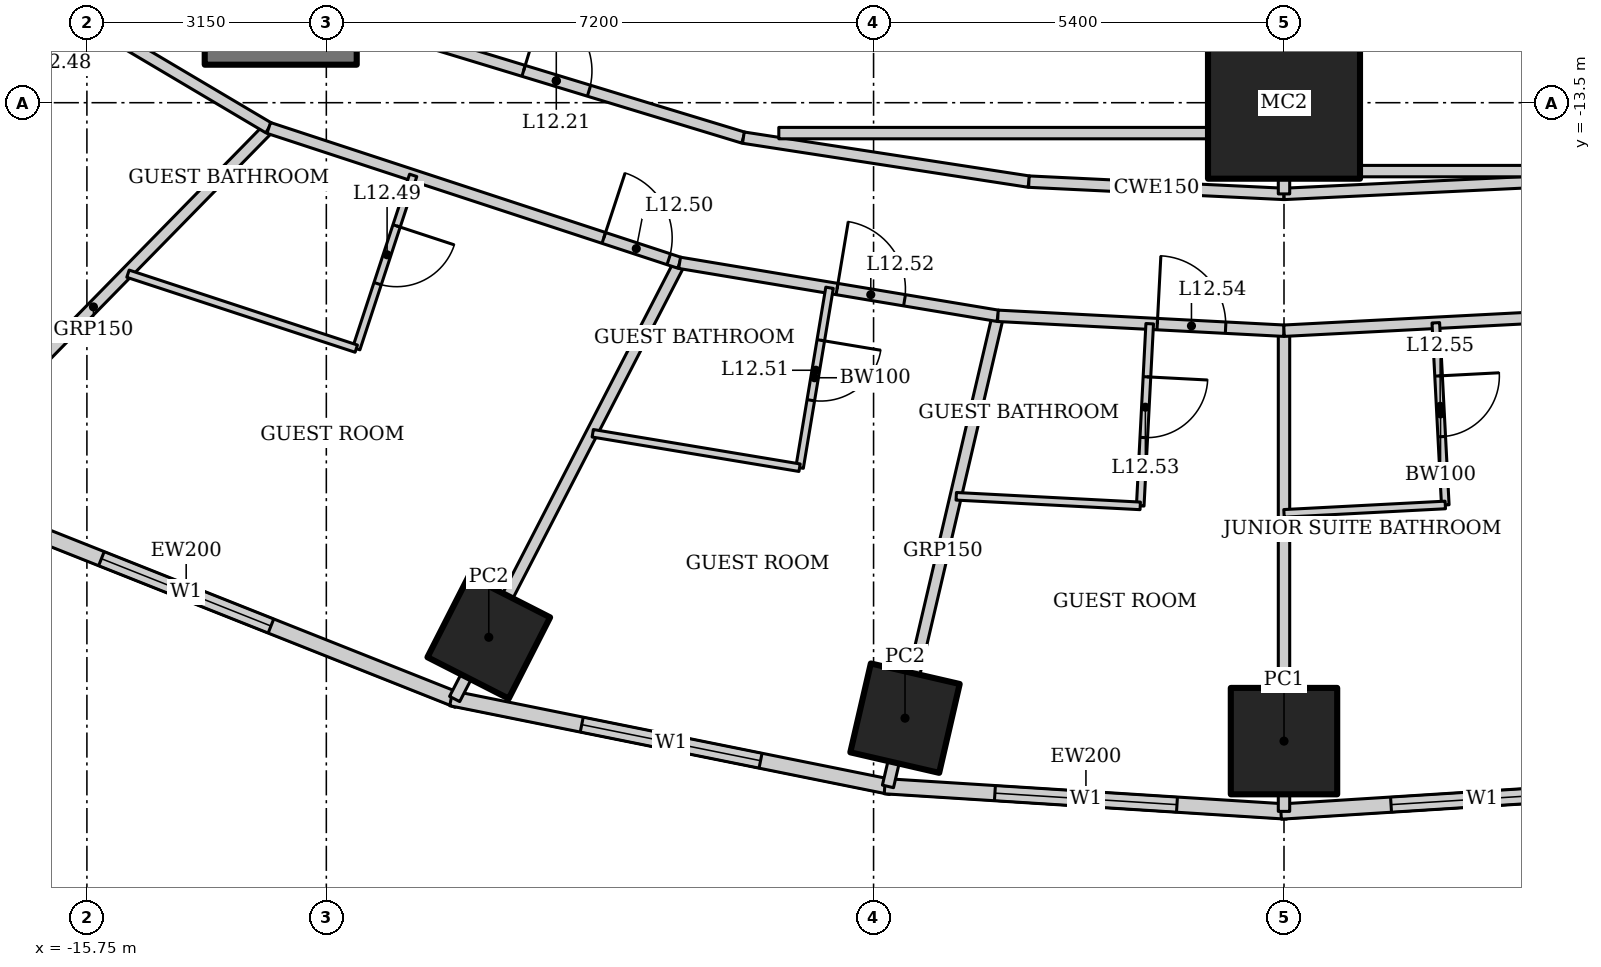
"""IFC4 building model, lengths in metres.
Left out: names, types, materials, properties, quantities, classifications, styles, units other than length and angle.
Written with IfcOpenShell. Run it as: python <this file> out.ifc"""

import sys

from ifc_helpers import new_model, si_unit, direction, frame, frame_2d, origin, origin_2d, place, context, subcontext, project, spatial, rectangle, hollow_rectangle, extrude, element, fill, save


model = new_model("IFC4")
c1 = context("Model", 3, precision=1e-05, world=origin(), true_north=direction((0.0, 1.0)))
c2 = subcontext(c1, "Body", "Model", "MODEL_VIEW")
j1 = project(units=[si_unit("LENGTHUNIT", "METRE"), si_unit("PLANEANGLEUNIT", "RADIAN")], contexts=[c1])
p1 = place(None, origin())
s1 = spatial("IfcSite", under=j1, at=p1, CompositionType="ELEMENT")
p2 = place(p1, origin())
s2 = spatial("IfcBuilding", under=s1, at=p2, CompositionType="ELEMENT")
p3 = place(p2, frame((0.0, 0.0, 58.6)))
s3 = spatial("IfcBuildingStorey", under=s2, at=p3, CompositionType="ELEMENT", Elevation=58.6)
p4 = place(p3, frame((0.0, -13.5, 0.0), z_axis=(0.0, 0.0, 1.0), x_axis=(1.0, 0.0, 0.0)))
e1 = element("IfcColumn", 1, at=p4, inside=s3, PredefinedType="COLUMN", context=c2, shape_type="SweptSolid", body=[
    extrude(hollow_rectangle(XDim=2.0, YDim=2.0, WallThickness=0.17, at=origin_2d()), origin(), (0.0, 0.0, 1.0), 3.6),
])
for number, where, z_axis, x_axis in (
    (2, (-10.463, -20.534, 0.0), (0.0, 0.0, 1.0), (0.454, 0.891, 0.0)),
    (3, (-4.986, -21.598, 0.0), (0.0, 0.0, 1.0), (0.225, 0.974, 0.0)),
):
    element("IfcColumn", number, at=place(p3, frame(where, z_axis=z_axis, x_axis=x_axis)), inside=s3, PredefinedType="COLUMN", context=c2, shape_type="SweptSolid", body=[
        extrude(hollow_rectangle(XDim=1.2, YDim=1.2, WallThickness=0.1, at=origin_2d()), origin(), (0.0, 0.0, 1.0), 3.6),
    ])
p5 = place(p3, frame((0.0, -21.9, 0.0), z_axis=(0.0, 0.0, 1.0), x_axis=(1.0, 0.0, 0.0)))
e4 = element("IfcColumn", 4, at=p5, inside=s3, PredefinedType="COLUMN", context=c2, shape_type="SweptSolid", body=[
    extrude(hollow_rectangle(XDim=1.4, YDim=1.4, WallThickness=0.1, at=origin_2d()), origin(), (0.0, 0.0, 1.0), 3.6),
])
p6 = place(p3, frame((-13.2, 13.0, 0.0), z_axis=(0.0, 0.0, 1.0), x_axis=(0.0, -1.0, 0.0)))
e5 = element("IfcWall", 5, at=p6, inside=s3, PredefinedType="SHEAR", context=c2, shape_type="SweptSolid", body=[
    extrude(rectangle(XDim=26.0, YDim=2.0, at=frame_2d((13.0, 0.0))), origin(), (0.0, 0.0, 1.0), 3.6),
])
p7 = place(p6, frame((12.1, 0.0, 0.0)))
e6 = element("IfcOpeningElement", 6, at=p7, cuts=e5, PredefinedType="OPENING", context=c2, shape_type="SweptSolid", body=[
    extrude(rectangle(XDim=1.8, YDim=2.1, at=frame_2d((0.9, 1.05))), frame((0.0, 1.01, 0.0), z_axis=(0.0, -1.0, 0.0), x_axis=(1.0, 0.0, 0.0)), (0.0, 0.0, 1.0), 2.02),
])
p8 = place(p3, frame((-18.018, -18.523, 0.0), z_axis=(0.0, 0.0, 1.0), x_axis=(0.929358351251, -0.369178892895, 0.0)))
e7 = element("IfcWall", 7, at=p8, inside=s3, PredefinedType="SOLIDWALL", context=c2, shape_type="SweptSolid", body=[
    extrude(rectangle(XDim=7.692, YDim=0.2, at=frame_2d((3.846, 0.0))), origin(), (0.0, 0.0, 1.0), 3.45),
])
p9 = place(p8, frame((2.646, 0.0, 0.5)))
e8 = element("IfcOpeningElement", 8, at=p9, cuts=e7, PredefinedType="OPENING", context=c2, shape_type="SweptSolid", body=[
    extrude(rectangle(XDim=2.4, YDim=2.2, at=frame_2d((1.2, 1.1))), frame((0.0, 0.11, 0.0), z_axis=(0.0, -1.0, 0.0), x_axis=(1.0, 0.0, 0.0)), (0.0, 0.0, 1.0), 0.22),
])
p10 = place(p3, frame((-10.957, -21.337, 0.0), z_axis=(0.0, 0.0, 1.0), x_axis=(0.980251657452, -0.197754110105, 0.0)))
e9 = element("IfcWall", 9, at=p10, inside=s3, PredefinedType="SOLIDWALL", context=c2, shape_type="SweptSolid", body=[
    extrude(rectangle(XDim=5.904, YDim=0.2, at=frame_2d((2.952, 0.0))), origin(), (0.0, 0.0, 1.0), 3.45),
])
p11 = place(p10, frame((1.752, 0.0, 0.5)))
e10 = element("IfcOpeningElement", 10, at=p11, cuts=e9, PredefinedType="OPENING", context=c2, shape_type="SweptSolid", body=[
    extrude(rectangle(XDim=2.4, YDim=2.2, at=frame_2d((1.2, 1.1))), frame((0.0, 0.11, 0.0), z_axis=(0.0, -1.0, 0.0), x_axis=(1.0, 0.0, 0.0)), (0.0, 0.0, 1.0), 0.22),
])
p12 = place(p3, frame((-5.253, -22.493, 0.0), z_axis=(0.0, 0.0, 1.0), x_axis=(0.998018582375, -0.062919863585, 0.0)))
e11 = element("IfcWall", 11, at=p12, inside=s3, PredefinedType="SOLIDWALL", context=c2, shape_type="SweptSolid", body=[
    extrude(rectangle(XDim=5.304, YDim=0.2, at=frame_2d((2.652, 0.0))), origin(), (0.0, 0.0, 1.0), 3.45),
])
p13 = place(p12, frame((1.452, 0.0, 0.5)))
e12 = element("IfcOpeningElement", 12, at=p13, cuts=e11, PredefinedType="OPENING", context=c2, shape_type="SweptSolid", body=[
    extrude(rectangle(XDim=2.4, YDim=2.2, at=frame_2d((1.2, 1.1))), frame((0.0, 0.11, 0.0), z_axis=(0.0, -1.0, 0.0), x_axis=(1.0, 0.0, 0.0)), (0.0, 0.0, 1.0), 0.22),
])
p14 = place(p3, frame((-0.041, -22.827, 0.0), z_axis=(0.0, 0.0, 1.0), x_axis=(0.998018582375, 0.062919863585, 0.0)))
e13 = element("IfcWall", 13, at=p14, inside=s3, PredefinedType="SOLIDWALL", context=c2, shape_type="SweptSolid", body=[
    extrude(rectangle(XDim=5.304, YDim=0.2, at=frame_2d((2.652, 0.0))), origin(), (0.0, 0.0, 1.0), 3.45),
])
p15 = place(p14, frame((1.452, 0.0, 0.5)))
e14 = element("IfcOpeningElement", 14, at=p15, cuts=e13, PredefinedType="OPENING", context=c2, shape_type="SweptSolid", body=[
    extrude(rectangle(XDim=2.4, YDim=2.2, at=frame_2d((1.2, 1.1))), frame((0.0, 0.11, 0.0), z_axis=(0.0, -1.0, 0.0), x_axis=(1.0, 0.0, 0.0)), (0.0, 0.0, 1.0), 0.22),
])
p16 = place(p3, frame((-17.97, -18.542, 0.0), z_axis=(0.0, 0.0, 1.0), x_axis=(0.699736251994, 0.714401272147, 0.0)))
e15 = element("IfcWall", 15, at=p16, inside=s3, PredefinedType="PARTITIONING", context=c2, shape_type="SweptSolid", body=[
    extrude(rectangle(XDim=6.593, YDim=0.15, at=frame_2d((3.296, 0.0))), origin(), (0.0, 0.0, 1.0), 2.528),
])
p17 = place(p3, frame((-10.912, -21.346, 0.0), z_axis=(0.0, 0.0, 1.0), x_axis=(0.458384799126, 0.888753833145, 0.0)))
e16 = element("IfcWall", 16, at=p17, inside=s3, PredefinedType="PARTITIONING", context=c2, shape_type="SweptSolid", body=[
    extrude(rectangle(XDim=6.457, YDim=0.15, at=frame_2d((3.229, 0.0))), origin(), (0.0, 0.0, 1.0), 2.528),
])
p18 = place(p3, frame((-5.211, -22.496, 0.0), z_axis=(0.0, 0.0, 1.0), x_axis=(0.227536694087, 0.973769507042, 0.0)))
e17 = element("IfcWall", 17, at=p18, inside=s3, PredefinedType="PARTITIONING", context=c2, shape_type="SweptSolid", body=[
    extrude(rectangle(XDim=6.358, YDim=0.15, at=frame_2d((3.179, 0.0))), origin(), (0.0, 0.0, 1.0), 2.767),
])
p19 = place(p3, frame((0.0, -22.825, 0.0), z_axis=(0.0, 0.0, 1.0), x_axis=(0.0, 1.0, 0.0)))
e18 = element("IfcWall", 18, at=p19, inside=s3, PredefinedType="PARTITIONING", context=c2, shape_type="SweptSolid", body=[
    extrude(rectangle(XDim=6.325, YDim=0.15, at=frame_2d((3.162, 0.0))), origin(), (0.0, 0.0, 1.0), 2.924),
])
p20 = place(p3, frame((-18.681, -10.675, 0.0), z_axis=(0.0, 0.0, 1.0), x_axis=(0.860147339762, -0.510045639036, 0.0)))
e19 = element("IfcWall", 19, at=p20, inside=s3, PredefinedType="PARTITIONING", context=c2, shape_type="SweptSolid", body=[
    extrude(rectangle(XDim=6.19, YDim=0.15, at=frame_2d((3.095, 0.0))), origin(), (0.0, 0.0, 1.0), 3.45),
])
p21 = place(p20, frame((2.505, 0.0, 0.0)))
e20 = element("IfcOpeningElement", 20, at=p21, cuts=e19, PredefinedType="OPENING", context=c2, shape_type="SweptSolid", body=[
    extrude(rectangle(XDim=0.9, YDim=2.1, at=frame_2d((0.45, 1.05))), frame((0.0, 0.085, 0.0), z_axis=(0.0, -1.0, 0.0), x_axis=(1.0, 0.0, 0.0)), (0.0, 0.0, 1.0), 0.17),
])
p22 = place(p3, frame((-13.357, -13.832, 0.0), z_axis=(0.0, 0.0, 1.0), x_axis=(0.950106803111, -0.311924770869, 0.0)))
e21 = element("IfcWall", 21, at=p22, inside=s3, PredefinedType="PARTITIONING", context=c2, shape_type="SweptSolid", body=[
    extrude(rectangle(XDim=5.689, YDim=0.15, at=frame_2d((2.845, 0.0))), origin(), (0.0, 0.0, 1.0), 3.45),
])
p23 = place(p22, frame((4.639, 0.0, 0.0)))
e22 = element("IfcOpeningElement", 22, at=p23, cuts=e21, PredefinedType="OPENING", context=c2, shape_type="SweptSolid", body=[
    extrude(rectangle(XDim=0.9, YDim=2.1, at=frame_2d((0.45, 1.05))), frame((0.0, 0.085, 0.0), z_axis=(0.0, -1.0, 0.0), x_axis=(1.0, 0.0, 0.0)), (0.0, 0.0, 1.0), 0.17),
])
p24 = place(p3, frame((-7.952, -15.607, 0.0), z_axis=(0.0, 0.0, 1.0), x_axis=(0.98641101506, -0.164296407044, 0.0)))
e23 = element("IfcWall", 23, at=p24, inside=s3, PredefinedType="PARTITIONING", context=c2, shape_type="SweptSolid", body=[
    extrude(rectangle(XDim=4.245, YDim=0.15, at=frame_2d((2.123, 0.0))), origin(), (0.0, 0.0, 1.0), 3.45),
])
p25 = place(p24, frame((2.1, 0.0, 0.0)))
e24 = element("IfcOpeningElement", 24, at=p25, cuts=e23, PredefinedType="OPENING", context=c2, shape_type="SweptSolid", body=[
    extrude(rectangle(XDim=0.9, YDim=2.1, at=frame_2d((0.45, 1.05))), frame((0.0, 0.085, 0.0), z_axis=(0.0, -1.0, 0.0), x_axis=(1.0, 0.0, 0.0)), (0.0, 0.0, 1.0), 0.17),
])
p26 = place(p3, frame((-3.764, -16.304, 0.0), z_axis=(0.0, 0.0, 1.0), x_axis=(0.998649848759, -0.05194689186, 0.0)))
e25 = element("IfcWall", 25, at=p26, inside=s3, PredefinedType="PARTITIONING", context=c2, shape_type="SweptSolid", body=[
    extrude(rectangle(XDim=3.769, YDim=0.15, at=frame_2d((1.885, 0.0))), origin(), (0.0, 0.0, 1.0), 3.45),
])
p27 = place(p26, frame((2.1, 0.0, 0.0)))
e26 = element("IfcOpeningElement", 26, at=p27, cuts=e25, PredefinedType="OPENING", context=c2, shape_type="SweptSolid", body=[
    extrude(rectangle(XDim=0.9, YDim=2.1, at=frame_2d((0.45, 1.05))), frame((0.0, 0.085, 0.0), z_axis=(0.0, -1.0, 0.0), x_axis=(1.0, 0.0, 0.0)), (0.0, 0.0, 1.0), 0.17),
])
p28 = place(p3, frame((0.0, -16.5, 0.0), z_axis=(0.0, 0.0, 1.0), x_axis=(0.998649848759, 0.05194689186, 0.0)))
e27 = element("IfcWall", 27, at=p28, inside=s3, PredefinedType="PARTITIONING", context=c2, shape_type="SweptSolid", body=[
    extrude(rectangle(XDim=3.769, YDim=0.15, at=frame_2d((1.885, 0.0))), origin(), (0.0, 0.0, 1.0), 3.45),
])
p29 = place(p3, frame((-12.036, -12.464, 0.0), z_axis=(0.0, 0.0, 1.0), x_axis=(0.956795045135, -0.290763205385, 0.0)))
e28 = element("IfcWall", 28, at=p29, inside=s3, PredefinedType="PARTITIONING", context=c2, shape_type="SweptSolid", body=[
    extrude(rectangle(XDim=5.146, YDim=0.15, at=frame_2d((2.573, 0.0))), origin(), (0.0, 0.0, 1.0), 3.45),
])
p30 = place(p29, frame((2.123, 0.0, 0.0)))
e29 = element("IfcOpeningElement", 29, at=p30, cuts=e28, PredefinedType="OPENING", context=c2, shape_type="SweptSolid", body=[
    extrude(rectangle(XDim=0.9, YDim=2.1, at=frame_2d((0.45, 1.05))), frame((0.0, 0.085, 0.0), z_axis=(0.0, -1.0, 0.0), x_axis=(1.0, 0.0, 0.0)), (0.0, 0.0, 1.0), 0.17),
])
p31 = place(p3, frame((-7.113, -13.96, 0.0), z_axis=(0.0, 0.0, 1.0), x_axis=(0.988343461108, -0.152240608529, 0.0)))
e30 = element("IfcWall", 30, at=p31, inside=s3, PredefinedType="PARTITIONING", context=c2, shape_type="SweptSolid", body=[
    extrude(rectangle(XDim=3.801, YDim=0.15, at=frame_2d((1.9, 0.0))), origin(), (0.0, 0.0, 1.0), 3.45),
])
for number, where, z_axis, x_axis in (
    (31, (-3.356, -14.538, 0.0), (0.0, 0.0, 1.0), (0.999, -0.048, 0.0)),
    (32, (0.0, -14.7, 0.0), (0.0, 0.0, 1.0), (0.999, 0.048, 0.0)),
):
    element("IfcWall", number, at=place(p3, frame(where, z_axis=z_axis, x_axis=x_axis)), inside=s3, PredefinedType="PARTITIONING", context=c2, shape_type="SweptSolid", body=[
        extrude(rectangle(XDim=3.36, YDim=0.15, at=frame_2d((1.68, 0.0))), origin(), (0.0, 0.0, 1.0), 3.45),
    ])
p32 = place(p3, frame((0.0, -9.2, 0.0), z_axis=(0.0, 0.0, 1.0), x_axis=(0.0, -1.0, 0.0)))
e33 = element("IfcWall", 33, at=p32, inside=s3, PredefinedType="PARTITIONING", context=c2, shape_type="SweptSolid", body=[
    extrude(rectangle(XDim=5.5, YDim=0.15, at=frame_2d((2.75, 0.0))), origin(), (0.0, 0.0, 1.0), 2.924),
])
p33 = place(p3, frame((-6.647, -13.9, 0.0), z_axis=(0.0, 0.0, 1.0), x_axis=(1.0, 0.0, 0.0)))
e34 = element("IfcWall", 34, at=p33, inside=s3, PredefinedType="PARTITIONING", context=c2, shape_type="SweptSolid", body=[
    extrude(rectangle(XDim=6.647, YDim=0.15, at=frame_2d((3.323, 0.0))), origin(), (0.0, 0.0, 1.0), 3.45),
])
p34 = place(p3, frame((0.0, -14.4, 0.0), z_axis=(0.0, 0.0, 1.0), x_axis=(1.0, 0.0, 0.0)))
e35 = element("IfcWall", 35, at=p34, inside=s3, PredefinedType="PARTITIONING", context=c2, shape_type="SweptSolid", body=[
    extrude(rectangle(XDim=3.401, YDim=0.15, at=frame_2d((1.701, 0.0))), origin(), (0.0, 0.0, 1.0), 3.45),
])
p35 = place(p3, frame((-11.457, -14.456, 0.0), z_axis=(0.0, 0.0, 1.0), x_axis=(-0.311890952591, -0.950117905153, 0.0)))
e36 = element("IfcWall", 36, at=p35, inside=s3, PredefinedType="PARTITIONING", context=c2, shape_type="SweptSolid", body=[
    extrude(rectangle(XDim=2.4, YDim=0.1, at=frame_2d((1.2, 0.0))), origin(), (0.0, 0.0, 1.0), 3.45),
])
p36 = place(p35, frame((0.7, 0.0, 0.0)))
e37 = element("IfcOpeningElement", 37, at=p36, cuts=e36, PredefinedType="OPENING", context=c2, shape_type="SweptSolid", body=[
    extrude(rectangle(XDim=0.8, YDim=2.1, at=frame_2d((0.4, 1.05))), frame((0.0, 0.06, 0.0), z_axis=(0.0, -1.0, 0.0), x_axis=(1.0, 0.0, 0.0)), (0.0, 0.0, 1.0), 0.12),
])
p37 = place(p3, frame((-12.206, -16.736, 0.0), z_axis=(0.0, 0.0, 1.0), x_axis=(-0.950109912386, 0.311915300018, 0.0)))
e38 = element("IfcWall", 38, at=p37, inside=s3, PredefinedType="PARTITIONING", context=c2, shape_type="SweptSolid", body=[
    extrude(rectangle(XDim=3.161, YDim=0.1, at=frame_2d((1.581, 0.0))), origin(), (0.0, 0.0, 1.0), 3.45),
])
p38 = place(p3, frame((-5.979, -15.935, 0.0), z_axis=(0.0, 0.0, 1.0), x_axis=(-0.164283516215, -0.986413162067, 0.0)))
e39 = element("IfcWall", 39, at=p38, inside=s3, PredefinedType="PARTITIONING", context=c2, shape_type="SweptSolid", body=[
    extrude(rectangle(XDim=2.4, YDim=0.1, at=frame_2d((1.2, 0.0))), origin(), (0.0, 0.0, 1.0), 2.914),
])
p39 = place(p38, frame((0.7, 0.0, 0.0)))
e40 = element("IfcOpeningElement", 40, at=p39, cuts=e39, PredefinedType="OPENING", context=c2, shape_type="SweptSolid", body=[
    extrude(rectangle(XDim=0.8, YDim=2.1, at=frame_2d((0.4, 1.05))), frame((0.0, 0.06, 0.0), z_axis=(0.0, -1.0, 0.0), x_axis=(1.0, 0.0, 0.0)), (0.0, 0.0, 1.0), 0.12),
])
p40 = place(p3, frame((-6.374, -18.303, 0.0), z_axis=(0.0, 0.0, 1.0), x_axis=(-0.98640348956, 0.164341582641, 0.0)))
e41 = element("IfcWall", 41, at=p40, inside=s3, PredefinedType="PARTITIONING", context=c2, shape_type="SweptSolid", body=[
    extrude(rectangle(XDim=2.759, YDim=0.1, at=frame_2d((1.379, 0.0))), origin(), (0.0, 0.0, 1.0), 3.45),
])
p41 = place(p3, frame((-1.767, -16.408, 0.0), z_axis=(0.0, 0.0, 1.0), x_axis=(-0.051982187452, -0.998648012158, 0.0)))
e42 = element("IfcWall", 42, at=p41, inside=s3, PredefinedType="PARTITIONING", context=c2, shape_type="SweptSolid", body=[
    extrude(rectangle(XDim=2.4, YDim=0.1, at=frame_2d((1.2, 0.0))), origin(), (0.0, 0.0, 1.0), 2.749),
])
p42 = place(p41, frame((0.7, 0.0, 0.0)))
e43 = element("IfcOpeningElement", 43, at=p42, cuts=e42, PredefinedType="OPENING", context=c2, shape_type="SweptSolid", body=[
    extrude(rectangle(XDim=0.8, YDim=2.1, at=frame_2d((0.4, 1.05))), frame((0.0, 0.06, 0.0), z_axis=(0.0, -1.0, 0.0), x_axis=(1.0, 0.0, 0.0)), (0.0, 0.0, 1.0), 0.12),
])
p43 = place(p3, frame((-1.892, -18.805, 0.0), z_axis=(0.0, 0.0, 1.0), x_axis=(-0.998648540987, 0.051972026944, 0.0)))
e44 = element("IfcWall", 44, at=p43, inside=s3, PredefinedType="PARTITIONING", context=c2, shape_type="SweptSolid", body=[
    extrude(rectangle(XDim=2.424, YDim=0.1, at=frame_2d((1.212, 0.0))), origin(), (0.0, 0.0, 1.0), 3.45),
])
p44 = place(p3, frame((1.997, -16.396, 0.0), z_axis=(0.0, 0.0, 1.0), x_axis=(0.051982187452, -0.998648012158, 0.0)))
e45 = element("IfcWall", 45, at=p44, inside=s3, PredefinedType="PARTITIONING", context=c2, shape_type="SweptSolid", body=[
    extrude(rectangle(XDim=2.4, YDim=0.1, at=frame_2d((1.2, 0.0))), origin(), (0.0, 0.0, 1.0), 2.749),
])
p45 = place(p44, frame((0.7, 0.0, 0.0)))
e46 = element("IfcOpeningElement", 46, at=p45, cuts=e45, PredefinedType="OPENING", context=c2, shape_type="SweptSolid", body=[
    extrude(rectangle(XDim=0.8, YDim=2.1, at=frame_2d((0.4, 1.05))), frame((0.0, 0.06, 0.0), z_axis=(0.0, -1.0, 0.0), x_axis=(1.0, 0.0, 0.0)), (0.0, 0.0, 1.0), 0.12),
])
p46 = place(p3, frame((2.122, -18.793, 0.0), z_axis=(0.0, 0.0, 1.0), x_axis=(-0.998644675281, -0.052046253785, 0.0)))
e47 = element("IfcWall", 47, at=p46, inside=s3, PredefinedType="PARTITIONING", context=c2, shape_type="SweptSolid", body=[
    extrude(rectangle(XDim=2.125, YDim=0.1, at=frame_2d((1.062, 0.0))), origin(), (0.0, 0.0, 1.0), 3.45),
])
p47 = place(p9, origin())
e48 = element("IfcWindow", 48, at=p47, inside=s3, PartitioningType="SINGLE_PANEL", PredefinedType="WINDOW", context=c2, shape_type="SweptSolid", body=[
    extrude(rectangle(XDim=2.4, YDim=2.2, at=frame_2d((1.2, 1.1))), frame((0.0, 0.03, 0.0), z_axis=(0.0, -1.0, 0.0), x_axis=(1.0, 0.0, 0.0)), (0.0, 0.0, 1.0), 0.06),
])
fill(e8, e48)
p48 = place(p11, origin())
e49 = element("IfcWindow", 49, at=p48, inside=s3, PartitioningType="SINGLE_PANEL", PredefinedType="WINDOW", context=c2, shape_type="SweptSolid", body=[
    extrude(rectangle(XDim=2.4, YDim=2.2, at=frame_2d((1.2, 1.1))), frame((0.0, 0.03, 0.0), z_axis=(0.0, -1.0, 0.0), x_axis=(1.0, 0.0, 0.0)), (0.0, 0.0, 1.0), 0.06),
])
fill(e10, e49)
p49 = place(p13, origin())
e50 = element("IfcWindow", 50, at=p49, inside=s3, PartitioningType="SINGLE_PANEL", PredefinedType="WINDOW", context=c2, shape_type="SweptSolid", body=[
    extrude(rectangle(XDim=2.4, YDim=2.2, at=frame_2d((1.2, 1.1))), frame((0.0, 0.03, 0.0), z_axis=(0.0, -1.0, 0.0), x_axis=(1.0, 0.0, 0.0)), (0.0, 0.0, 1.0), 0.06),
])
fill(e12, e50)
p50 = place(p15, origin())
e51 = element("IfcWindow", 51, at=p50, inside=s3, PartitioningType="SINGLE_PANEL", PredefinedType="WINDOW", context=c2, shape_type="SweptSolid", body=[
    extrude(rectangle(XDim=2.4, YDim=2.2, at=frame_2d((1.2, 1.1))), frame((0.0, 0.03, 0.0), z_axis=(0.0, -1.0, 0.0), x_axis=(1.0, 0.0, 0.0)), (0.0, 0.0, 1.0), 0.06),
])
fill(e14, e51)
p51 = place(p30, origin())
e52 = element("IfcDoor", 52, at=p51, inside=s3, OperationType="SINGLE_SWING_LEFT", PredefinedType="DOOR", context=c2, shape_type="SweptSolid", body=[
    extrude(rectangle(XDim=0.9, YDim=2.1, at=frame_2d((0.45, 1.05))), frame((0.0, 0.025, 0.0), z_axis=(0.0, -1.0, 0.0), x_axis=(1.0, 0.0, 0.0)), (0.0, 0.0, 1.0), 0.05),
])
fill(e29, e52)
p52 = place(p36, origin())
e53 = element("IfcDoor", 53, at=p52, inside=s3, OperationType="SINGLE_SWING_LEFT", PredefinedType="DOOR", context=c2, shape_type="SweptSolid", body=[
    extrude(rectangle(XDim=0.8, YDim=2.1, at=frame_2d((0.4, 1.05))), frame((0.0, 0.025, 0.0), z_axis=(0.0, -1.0, 0.0), x_axis=(1.0, 0.0, 0.0)), (0.0, 0.0, 1.0), 0.05),
])
fill(e37, e53)
p53 = place(p23, origin())
e54 = element("IfcDoor", 54, at=p53, inside=s3, OperationType="SINGLE_SWING_LEFT", PredefinedType="DOOR", context=c2, shape_type="SweptSolid", body=[
    extrude(rectangle(XDim=0.9, YDim=2.1, at=frame_2d((0.45, 1.05))), frame((0.0, 0.025, 0.0), z_axis=(0.0, -1.0, 0.0), x_axis=(1.0, 0.0, 0.0)), (0.0, 0.0, 1.0), 0.05),
])
fill(e22, e54)
p54 = place(p39, origin())
e55 = element("IfcDoor", 55, at=p54, inside=s3, OperationType="SINGLE_SWING_LEFT", PredefinedType="DOOR", context=c2, shape_type="SweptSolid", body=[
    extrude(rectangle(XDim=0.8, YDim=2.1, at=frame_2d((0.4, 1.05))), frame((0.0, 0.025, 0.0), z_axis=(0.0, -1.0, 0.0), x_axis=(1.0, 0.0, 0.0)), (0.0, 0.0, 1.0), 0.05),
])
fill(e40, e55)
p55 = place(p25, origin())
e56 = element("IfcDoor", 56, at=p55, inside=s3, OperationType="SINGLE_SWING_LEFT", PredefinedType="DOOR", context=c2, shape_type="SweptSolid", body=[
    extrude(rectangle(XDim=0.9, YDim=2.1, at=frame_2d((0.45, 1.05))), frame((0.0, 0.025, 0.0), z_axis=(0.0, -1.0, 0.0), x_axis=(1.0, 0.0, 0.0)), (0.0, 0.0, 1.0), 0.05),
])
fill(e24, e56)
p56 = place(p42, origin())
e57 = element("IfcDoor", 57, at=p56, inside=s3, OperationType="SINGLE_SWING_LEFT", PredefinedType="DOOR", context=c2, shape_type="SweptSolid", body=[
    extrude(rectangle(XDim=0.8, YDim=2.1, at=frame_2d((0.4, 1.05))), frame((0.0, 0.025, 0.0), z_axis=(0.0, -1.0, 0.0), x_axis=(1.0, 0.0, 0.0)), (0.0, 0.0, 1.0), 0.05),
])
fill(e43, e57)
p57 = place(p27, origin())
e58 = element("IfcDoor", 58, at=p57, inside=s3, OperationType="SINGLE_SWING_LEFT", PredefinedType="DOOR", context=c2, shape_type="SweptSolid", body=[
    extrude(rectangle(XDim=0.9, YDim=2.1, at=frame_2d((0.45, 1.05))), frame((0.0, 0.025, 0.0), z_axis=(0.0, -1.0, 0.0), x_axis=(1.0, 0.0, 0.0)), (0.0, 0.0, 1.0), 0.05),
])
fill(e26, e58)
p58 = place(p45, origin())
e59 = element("IfcDoor", 59, at=p58, inside=s3, OperationType="SINGLE_SWING_LEFT", PredefinedType="DOOR", context=c2, shape_type="SweptSolid", body=[
    extrude(rectangle(XDim=0.8, YDim=2.1, at=frame_2d((0.4, 1.05))), frame((0.0, 0.025, 0.0), z_axis=(0.0, -1.0, 0.0), x_axis=(1.0, 0.0, 0.0)), (0.0, 0.0, 1.0), 0.05),
])
fill(e46, e59)
save(model, sys.argv[1])
